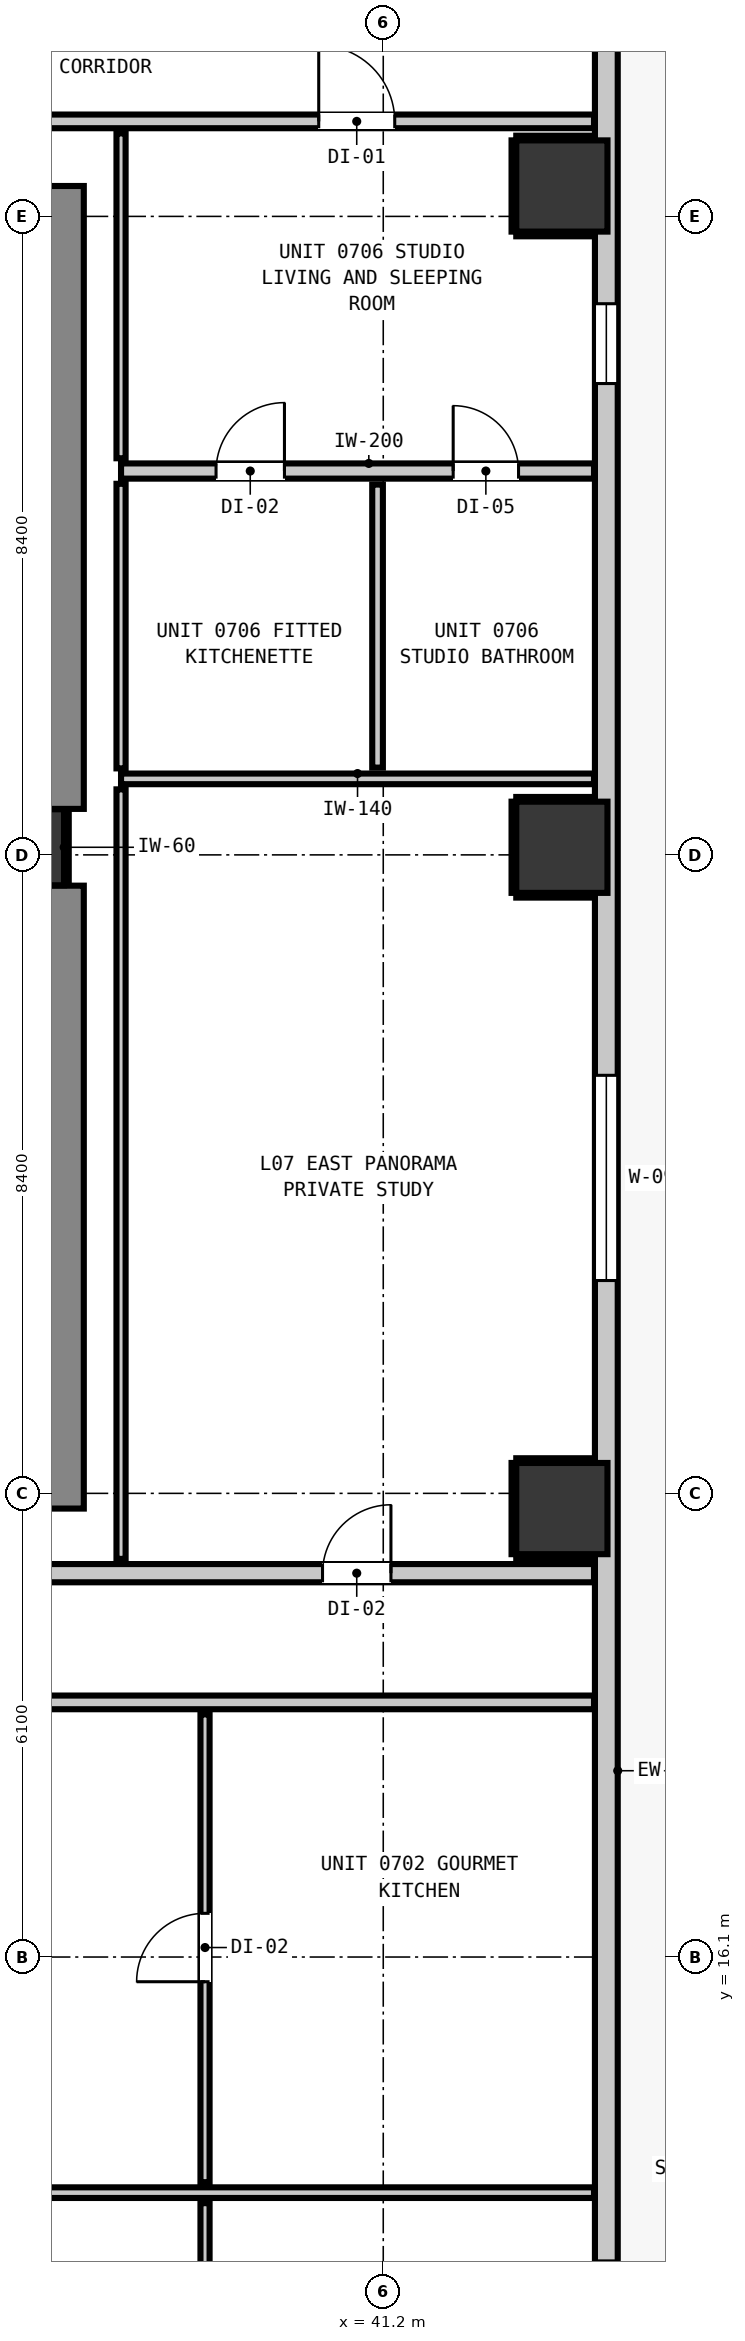
"""IFC4 building model, lengths in metres.
Left out: names, types, materials, properties, quantities, classifications, styles, units other than length and angle.
Written with IfcOpenShell. Run it as: python <this file> out.ifc"""

import sys

from ifc_helpers import new_model, si_unit, direction, frame, frame_2d, origin, origin_2d, place, context, subcontext, project, spatial, rectangle, extrude, element, fill, save


model = new_model("IFC4")
c1 = context("Model", 3, precision=1e-05, world=origin(), true_north=direction((0.0, 1.0)))
c2 = subcontext(c1, "Body", "Model", "MODEL_VIEW")
j1 = project(units=[si_unit("LENGTHUNIT", "METRE"), si_unit("PLANEANGLEUNIT", "RADIAN")], contexts=[c1])
p1 = place(None, origin())
s1 = spatial("IfcSite", under=j1, at=p1, CompositionType="ELEMENT")
p2 = place(p1, origin())
s2 = spatial("IfcBuilding", under=s1, at=p2, CompositionType="ELEMENT")
p3 = place(p2, frame((0.0, 0.0, 28.64)))
s3 = spatial("IfcBuildingStorey", under=s2, at=p3, CompositionType="ELEMENT", Elevation=28.64)
p4 = place(p3, frame((36.5, 30.7, 0.0), z_axis=(0.0, 0.0, 1.0), x_axis=(1.0, 0.0, 0.0)))
e1 = element("IfcColumn", 1, at=p4, inside=s3, PredefinedType="COLUMN", context=c2, shape_type="SweptSolid", body=[
    extrude(rectangle(XDim=1.0, YDim=1.0, at=origin_2d()), origin(), (0.0, 0.0, 1.0), 3.32),
])
p5 = place(p3, frame((36.66, 22.0, 0.0), z_axis=(0.0, 0.0, 1.0), x_axis=(0.0, 1.0, 0.0)))
e2 = element("IfcWall", 2, at=p5, inside=s3, PredefinedType="SHEAR", context=c2, shape_type="SweptSolid", body=[
    extrude(rectangle(XDim=8.195, YDim=1.2, at=frame_2d((4.098, 0.0))), origin(), (0.0, 0.0, 1.0), 3.32),
])
p6 = place(p3, frame((36.66, 31.205, 0.0), z_axis=(0.0, 0.0, 1.0), x_axis=(0.0, 1.0, 0.0)))
e3 = element("IfcWall", 3, at=p6, inside=s3, PredefinedType="SHEAR", context=c2, shape_type="SweptSolid", body=[
    extrude(rectangle(XDim=8.195, YDim=1.2, at=frame_2d((4.097, 0.0))), origin(), (0.0, 0.0, 1.0), 3.32),
])
for number, where, z_axis, x_axis in (
    (4, (43.55, 22.0, 0.0), (0.0, 0.0, 1.0), (1.0, 0.0, 0.0)),
    (5, (43.55, 30.7, 0.0), (0.0, 0.0, 1.0), (1.0, 0.0, 0.0)),
    (6, (43.55, 39.4, 0.0), (0.0, 0.0, 1.0), (1.0, 0.0, 0.0)),
):
    element("IfcColumn", number, at=place(p3, frame(where, z_axis=z_axis, x_axis=x_axis)), inside=s3, PredefinedType="COLUMN", context=c2, shape_type="SweptSolid", body=[
        extrude(rectangle(XDim=1.2, YDim=1.2, at=origin_2d()), origin(), (0.0, 0.0, 1.0), 3.32),
    ])
p7 = place(p3, frame((44.135, 44.835, 0.0), z_axis=(0.0, 0.0, 1.0), x_axis=(0.0, -1.0, 0.0)))
e7 = element("IfcWall", 7, at=p7, inside=s3, PredefinedType="STANDARD", context=c2, shape_type="SweptSolid", body=[
    extrude(rectangle(XDim=34.67, YDim=0.3, at=frame_2d((17.335, 0.0))), origin(), (0.0, 0.0, 1.0), 3.06),
])
p8 = place(p7, frame((1.251, 0.0, 0.0)))
e8 = element("IfcOpeningElement", 8, at=p8, cuts=e7, PredefinedType="OPENING", context=c2, shape_type="SweptSolid", body=[
    extrude(rectangle(XDim=1.0, YDim=2.15, at=frame_2d((0.5, 1.075))), frame((0.0, 0.16, 0.0), z_axis=(0.0, -1.0, 0.0), x_axis=(1.0, 0.0, 0.0)), (0.0, 0.0, 1.0), 0.32),
])
p9 = place(p7, frame((32.733, 0.0, 0.85)))
e9 = element("IfcOpeningElement", 9, at=p9, cuts=e7, PredefinedType="OPENING", context=c2, shape_type="SweptSolid", body=[
    extrude(rectangle(XDim=1.05, YDim=1.65, at=frame_2d((0.525, 0.825))), frame((0.0, 0.16, 0.0), z_axis=(0.0, -1.0, 0.0), x_axis=(1.0, 0.0, 0.0)), (0.0, 0.0, 1.0), 0.32),
])
p10 = place(p7, frame((17.135, 0.0, 0.85)))
e10 = element("IfcOpeningElement", 10, at=p10, cuts=e7, PredefinedType="OPENING", context=c2, shape_type="SweptSolid", body=[
    extrude(rectangle(XDim=2.7, YDim=2.0, at=frame_2d((1.35, 1.0))), frame((0.0, 0.16, 0.0), z_axis=(0.0, -1.0, 0.0), x_axis=(1.0, 0.0, 0.0)), (0.0, 0.0, 1.0), 0.32),
])
p11 = place(p7, frame((6.984, 0.0, 0.85)))
e11 = element("IfcOpeningElement", 11, at=p11, cuts=e7, PredefinedType="OPENING", context=c2, shape_type="SweptSolid", body=[
    extrude(rectangle(XDim=1.05, YDim=1.65, at=frame_2d((0.525, 0.825))), frame((0.0, 0.16, 0.0), z_axis=(0.0, -1.0, 0.0), x_axis=(1.0, 0.0, 0.0)), (0.0, 0.0, 1.0), 0.32),
])
p12 = place(p3, frame((1.827, 21.15, 0.0), z_axis=(0.0, 0.0, 1.0), x_axis=(1.0, 0.0, 0.0)))
e12 = element("IfcWall", 12, at=p12, inside=s3, PredefinedType="PARTITIONING", context=c2, shape_type="SweptSolid", body=[
    extrude(rectangle(XDim=42.146, YDim=0.24, at=frame_2d((21.073, 0.0))), origin(), (0.0, 0.0, 1.0), 3.06),
])
p13 = place(p12, frame((16.383, 0.0, 0.0)))
e13 = element("IfcOpeningElement", 13, at=p13, cuts=e12, PredefinedType="OPENING", context=c2, shape_type="SweptSolid", body=[
    extrude(rectangle(XDim=1.1, YDim=2.15, at=frame_2d((0.55, 1.075))), frame((0.0, 0.13, 0.0), z_axis=(0.0, -1.0, 0.0), x_axis=(1.0, 0.0, 0.0)), (0.0, 0.0, 1.0), 0.26),
])
p14 = place(p12, frame((8.647, 0.0, 0.0)))
e14 = element("IfcOpeningElement", 14, at=p14, cuts=e12, PredefinedType="OPENING", context=c2, shape_type="SweptSolid", body=[
    extrude(rectangle(XDim=1.4, YDim=2.15, at=frame_2d((0.7, 1.075))), frame((0.0, 0.13, 0.0), z_axis=(0.0, -1.0, 0.0), x_axis=(1.0, 0.0, 0.0)), (0.0, 0.0, 1.0), 0.26),
])
p15 = place(p12, frame((38.574, 0.0, 0.0)))
e15 = element("IfcOpeningElement", 15, at=p15, cuts=e12, PredefinedType="OPENING", context=c2, shape_type="SweptSolid", body=[
    extrude(rectangle(XDim=0.9, YDim=2.1, at=frame_2d((0.45, 1.05))), frame((0.0, 0.13, 0.0), z_axis=(0.0, -1.0, 0.0), x_axis=(1.0, 0.0, 0.0)), (0.0, 0.0, 1.0), 0.26),
])
p16 = place(p3, frame((37.75, 35.65, 0.0), z_axis=(0.0, 0.0, 1.0), x_axis=(1.0, 0.0, 0.0)))
e16 = element("IfcWall", 16, at=p16, inside=s3, PredefinedType="PARTITIONING", context=c2, shape_type="SweptSolid", body=[
    extrude(rectangle(XDim=6.223, YDim=0.2, at=frame_2d((3.111, 0.0))), origin(), (0.0, 0.0, 1.0), 3.06),
])
p17 = place(p16, frame((1.25, 0.0, 0.0)))
e17 = element("IfcOpeningElement", 17, at=p17, cuts=e16, PredefinedType="OPENING", context=c2, shape_type="SweptSolid", body=[
    extrude(rectangle(XDim=0.9, YDim=2.1, at=frame_2d((0.45, 1.05))), frame((0.0, 0.11, 0.0), z_axis=(0.0, -1.0, 0.0), x_axis=(1.0, 0.0, 0.0)), (0.0, 0.0, 1.0), 0.22),
])
p18 = place(p16, frame((4.37, 0.0, 0.0)))
e18 = element("IfcOpeningElement", 18, at=p18, cuts=e16, PredefinedType="OPENING", context=c2, shape_type="SweptSolid", body=[
    extrude(rectangle(XDim=0.86, YDim=2.02, at=frame_2d((0.43, 1.01))), frame((0.0, 0.11, 0.0), z_axis=(0.0, -1.0, 0.0), x_axis=(1.0, 0.0, 0.0)), (0.0, 0.0, 1.0), 0.22),
])
p19 = place(p3, frame((1.827, 19.45, 0.0), z_axis=(0.0, 0.0, 1.0), x_axis=(1.0, 0.0, 0.0)))
e19 = element("IfcWall", 19, at=p19, inside=s3, PredefinedType="PARTITIONING", context=c2, shape_type="SweptSolid", body=[
    extrude(rectangle(XDim=42.146, YDim=0.18, at=frame_2d((21.073, 0.0))), origin(), (0.0, 0.0, 1.0), 3.06),
])
p20 = place(p19, frame((8.602, 0.0, 0.0)))
e20 = element("IfcOpeningElement", 20, at=p20, cuts=e19, PredefinedType="OPENING", context=c2, shape_type="SweptSolid", body=[
    extrude(rectangle(XDim=1.0, YDim=2.15, at=frame_2d((0.5, 1.075))), frame((0.0, 0.1, 0.0), z_axis=(0.0, -1.0, 0.0), x_axis=(1.0, 0.0, 0.0)), (0.0, 0.0, 1.0), 0.2),
])
p21 = place(p19, frame((30.475, 0.0, 0.0)))
e21 = element("IfcOpeningElement", 21, at=p21, cuts=e19, PredefinedType="OPENING", context=c2, shape_type="SweptSolid", body=[
    extrude(rectangle(XDim=1.0, YDim=2.15, at=frame_2d((0.5, 1.075))), frame((0.0, 0.1, 0.0), z_axis=(0.0, -1.0, 0.0), x_axis=(1.0, 0.0, 0.0)), (0.0, 0.0, 1.0), 0.2),
])
p22 = place(p3, frame((12.989, 40.25, 0.0), z_axis=(0.0, 0.0, 1.0), x_axis=(1.0, 0.0, 0.0)))
e22 = element("IfcWall", 22, at=p22, inside=s3, PredefinedType="PARTITIONING", context=c2, shape_type="SweptSolid", body=[
    extrude(rectangle(XDim=30.984, YDim=0.18, at=frame_2d((15.492, 0.0))), origin(), (0.0, 0.0, 1.0), 3.06),
])
p23 = place(p22, frame((4.446, 0.0, 0.0)))
e23 = element("IfcOpeningElement", 23, at=p23, cuts=e22, PredefinedType="OPENING", context=c2, shape_type="SweptSolid", body=[
    extrude(rectangle(XDim=1.4, YDim=2.15, at=frame_2d((0.7, 1.075))), frame((0.0, 0.1, 0.0), z_axis=(0.0, -1.0, 0.0), x_axis=(1.0, 0.0, 0.0)), (0.0, 0.0, 1.0), 0.2),
])
p24 = place(p22, frame((27.362, 0.0, 0.0)))
e24 = element("IfcOpeningElement", 24, at=p24, cuts=e22, PredefinedType="OPENING", context=c2, shape_type="SweptSolid", body=[
    extrude(rectangle(XDim=1.0, YDim=2.15, at=frame_2d((0.5, 1.075))), frame((0.0, 0.1, 0.0), z_axis=(0.0, -1.0, 0.0), x_axis=(1.0, 0.0, 0.0)), (0.0, 0.0, 1.0), 0.2),
])
p25 = place(p3, frame((11.688, 13.0, 0.0), z_axis=(0.0, 0.0, 1.0), x_axis=(1.0, 0.0, 0.0)))
e25 = element("IfcWall", 25, at=p25, inside=s3, PredefinedType="PARTITIONING", context=c2, shape_type="SweptSolid", body=[
    extrude(rectangle(XDim=32.285, YDim=0.14, at=frame_2d((16.143, 0.0))), origin(), (0.0, 0.0, 1.0), 3.06),
])
p26 = place(p25, frame((20.664, 0.0, 0.0)))
e26 = element("IfcOpeningElement", 26, at=p26, cuts=e25, PredefinedType="OPENING", context=c2, shape_type="SweptSolid", body=[
    extrude(rectangle(XDim=0.9, YDim=2.1, at=frame_2d((0.45, 1.05))), frame((0.0, 0.08, 0.0), z_axis=(0.0, -1.0, 0.0), x_axis=(1.0, 0.0, 0.0)), (0.0, 0.0, 1.0), 0.16),
])
p27 = place(p3, frame((37.75, 31.6, 0.0), z_axis=(0.0, 0.0, 1.0), x_axis=(1.0, 0.0, 0.0)))
e27 = element("IfcWall", 27, at=p27, inside=s3, PredefinedType="PARTITIONING", context=c2, shape_type="SweptSolid", body=[
    extrude(rectangle(XDim=6.223, YDim=0.14, at=frame_2d((3.111, 0.0))), origin(), (0.0, 0.0, 1.0), 3.06),
])
p28 = place(p3, frame((41.125, 31.748, 0.0), z_axis=(0.0, 0.0, 1.0), x_axis=(0.0, 1.0, 0.0)))
e28 = element("IfcWall", 28, at=p28, inside=s3, PredefinedType="PARTITIONING", context=c2, shape_type="SweptSolid", body=[
    extrude(rectangle(XDim=3.724, YDim=0.14, at=frame_2d((1.862, 0.0))), origin(), (0.0, 0.0, 1.0), 3.06),
])
p29 = place(p3, frame((37.75, 21.338, 0.0), z_axis=(0.0, 0.0, 1.0), x_axis=(0.0, 1.0, 0.0)))
e29 = element("IfcWall", 29, at=p29, inside=s3, PredefinedType="PARTITIONING", context=c2, shape_type="SweptSolid", body=[
    extrude(rectangle(XDim=10.124, YDim=0.12, at=frame_2d((5.062, 0.0))), origin(), (0.0, 0.0, 1.0), 3.06),
])
p30 = place(p3, frame((37.75, 31.738, 0.0), z_axis=(0.0, 0.0, 1.0), x_axis=(0.0, 1.0, 0.0)))
e30 = element("IfcWall", 30, at=p30, inside=s3, PredefinedType="PARTITIONING", context=c2, shape_type="SweptSolid", body=[
    extrude(rectangle(XDim=3.744, YDim=0.12, at=frame_2d((1.872, 0.0))), origin(), (0.0, 0.0, 1.0), 3.06),
])
p31 = place(p3, frame((37.75, 35.818, 0.0), z_axis=(0.0, 0.0, 1.0), x_axis=(0.0, 1.0, 0.0)))
e31 = element("IfcWall", 31, at=p31, inside=s3, PredefinedType="PARTITIONING", context=c2, shape_type="SweptSolid", body=[
    extrude(rectangle(XDim=4.274, YDim=0.12, at=frame_2d((2.137, 0.0))), origin(), (0.0, 0.0, 1.0), 3.06),
])
p32 = place(p3, frame((38.855, 8.691, 0.0), z_axis=(0.0, 0.0, 1.0), x_axis=(0.0, 1.0, 0.0)))
e32 = element("IfcWall", 32, at=p32, inside=s3, PredefinedType="PARTITIONING", context=c2, shape_type="SweptSolid", body=[
    extrude(rectangle(XDim=4.171, YDim=0.12, at=frame_2d((2.085, 0.0))), origin(), (0.0, 0.0, 1.0), 2.445),
])
p33 = place(p32, frame((1.259, 0.0, 0.0)))
e33 = element("IfcOpeningElement", 33, at=p33, cuts=e32, PredefinedType="OPENING", context=c2, shape_type="SweptSolid", body=[
    extrude(rectangle(XDim=0.9, YDim=2.1, at=frame_2d((0.45, 1.05))), frame((0.0, 0.07, 0.0), z_axis=(0.0, -1.0, 0.0), x_axis=(1.0, 0.0, 0.0)), (0.0, 0.0, 1.0), 0.14),
])
p34 = place(p3, frame((38.855, 13.138, 0.0), z_axis=(0.0, 0.0, 1.0), x_axis=(0.0, 1.0, 0.0)))
e34 = element("IfcWall", 34, at=p34, inside=s3, PredefinedType="PARTITIONING", context=c2, shape_type="SweptSolid", body=[
    extrude(rectangle(XDim=6.154, YDim=0.12, at=frame_2d((3.077, 0.0))), origin(), (0.0, 0.0, 1.0), 2.445),
])
p35 = place(p34, frame((2.637, 0.0, 0.0)))
e35 = element("IfcOpeningElement", 35, at=p35, cuts=e34, PredefinedType="OPENING", context=c2, shape_type="SweptSolid", body=[
    extrude(rectangle(XDim=0.9, YDim=2.1, at=frame_2d((0.45, 1.05))), frame((0.0, 0.07, 0.0), z_axis=(0.0, -1.0, 0.0), x_axis=(1.0, 0.0, 0.0)), (0.0, 0.0, 1.0), 0.14),
])
p36 = place(p3, frame((37.032, 30.21, 0.0), z_axis=(0.0, 0.0, 1.0), x_axis=(0.0, 1.0, 0.0)))
e36 = element("IfcWall", 36, at=p36, inside=s3, PredefinedType="PARTITIONING", context=c2, shape_type="SweptSolid", body=[
    extrude(rectangle(XDim=0.98, YDim=0.06, at=frame_2d((0.49, 0.0))), origin(), (0.0, 0.0, 1.0), 1.45),
])
for number, where, z_axis, x_axis in (
    (37, (42.95, 21.368, 0.0), (0.0, 0.0, 1.0), (1.0, 0.0, 0.0)),
    (38, (42.95, 22.632, 0.0), (0.0, 0.0, 1.0), (1.0, 0.0, 0.0)),
):
    element("IfcWall", number, at=place(p3, frame(where, z_axis=z_axis, x_axis=x_axis)), inside=s3, PredefinedType="PARTITIONING", context=c2, shape_type="SweptSolid", body=[
        extrude(rectangle(XDim=1.02, YDim=0.06, at=frame_2d((0.51, 0.0))), origin(), (0.0, 0.0, 1.0), 1.45),
    ])
p37 = place(p3, frame((42.918, 21.4, 0.0), z_axis=(0.0, 0.0, 1.0), x_axis=(0.0, 1.0, 0.0)))
e39 = element("IfcWall", 39, at=p37, inside=s3, PredefinedType="PARTITIONING", context=c2, shape_type="SweptSolid", body=[
    extrude(rectangle(XDim=1.2, YDim=0.06, at=frame_2d((0.6, 0.0))), origin(), (0.0, 0.0, 1.0), 1.45),
])
for number, where, z_axis, x_axis in (
    (40, (42.95, 30.068, 0.0), (0.0, 0.0, 1.0), (1.0, 0.0, 0.0)),
    (41, (42.95, 31.332, 0.0), (0.0, 0.0, 1.0), (1.0, 0.0, 0.0)),
):
    element("IfcWall", number, at=place(p3, frame(where, z_axis=z_axis, x_axis=x_axis)), inside=s3, PredefinedType="PARTITIONING", context=c2, shape_type="SweptSolid", body=[
        extrude(rectangle(XDim=1.02, YDim=0.06, at=frame_2d((0.51, 0.0))), origin(), (0.0, 0.0, 1.0), 1.45),
    ])
p38 = place(p3, frame((42.918, 30.1, 0.0), z_axis=(0.0, 0.0, 1.0), x_axis=(0.0, 1.0, 0.0)))
e42 = element("IfcWall", 42, at=p38, inside=s3, PredefinedType="PARTITIONING", context=c2, shape_type="SweptSolid", body=[
    extrude(rectangle(XDim=1.2, YDim=0.06, at=frame_2d((0.6, 0.0))), origin(), (0.0, 0.0, 1.0), 1.45),
])
for number, where, z_axis, x_axis in (
    (43, (42.95, 38.768, 0.0), (0.0, 0.0, 1.0), (1.0, 0.0, 0.0)),
    (44, (42.95, 40.032, 0.0), (0.0, 0.0, 1.0), (1.0, 0.0, 0.0)),
):
    element("IfcWall", number, at=place(p3, frame(where, z_axis=z_axis, x_axis=x_axis)), inside=s3, PredefinedType="PARTITIONING", context=c2, shape_type="SweptSolid", body=[
        extrude(rectangle(XDim=1.02, YDim=0.06, at=frame_2d((0.51, 0.0))), origin(), (0.0, 0.0, 1.0), 1.45),
    ])
p39 = place(p3, frame((42.918, 38.8, 0.0), z_axis=(0.0, 0.0, 1.0), x_axis=(0.0, 1.0, 0.0)))
e45 = element("IfcWall", 45, at=p39, inside=s3, PredefinedType="PARTITIONING", context=c2, shape_type="SweptSolid", body=[
    extrude(rectangle(XDim=1.2, YDim=0.06, at=frame_2d((0.6, 0.0))), origin(), (0.0, 0.0, 1.0), 1.45),
])
p40 = place(p9, origin())
e46 = element("IfcWindow", 46, at=p40, inside=s3, PartitioningType="SINGLE_PANEL", PredefinedType="WINDOW", context=c2, shape_type="SweptSolid", body=[
    extrude(rectangle(XDim=1.05, YDim=1.65, at=frame_2d((0.525, 0.825))), frame((0.0, 0.03, 0.0), z_axis=(0.0, -1.0, 0.0), x_axis=(1.0, 0.0, 0.0)), (0.0, 0.0, 1.0), 0.06),
])
fill(e9, e46)
p41 = place(p10, origin())
e47 = element("IfcWindow", 47, at=p41, inside=s3, PartitioningType="SINGLE_PANEL", PredefinedType="WINDOW", context=c2, shape_type="SweptSolid", body=[
    extrude(rectangle(XDim=2.7, YDim=2.0, at=frame_2d((1.35, 1.0))), frame((0.0, 0.03, 0.0), z_axis=(0.0, -1.0, 0.0), x_axis=(1.0, 0.0, 0.0)), (0.0, 0.0, 1.0), 0.06),
])
fill(e10, e47)
p42 = place(p11, origin())
e48 = element("IfcWindow", 48, at=p42, inside=s3, PartitioningType="SINGLE_PANEL", PredefinedType="WINDOW", context=c2, shape_type="SweptSolid", body=[
    extrude(rectangle(XDim=1.05, YDim=1.65, at=frame_2d((0.525, 0.825))), frame((0.0, 0.03, 0.0), z_axis=(0.0, -1.0, 0.0), x_axis=(1.0, 0.0, 0.0)), (0.0, 0.0, 1.0), 0.06),
])
fill(e11, e48)
p43 = place(p35, origin())
e49 = element("IfcDoor", 49, at=p43, inside=s3, OperationType="SINGLE_SWING_LEFT", PredefinedType="DOOR", context=c2, shape_type="SweptSolid", body=[
    extrude(rectangle(XDim=0.9, YDim=2.1, at=frame_2d((0.45, 1.05))), frame((0.0, 0.025, 0.0), z_axis=(0.0, -1.0, 0.0), x_axis=(1.0, 0.0, 0.0)), (0.0, 0.0, 1.0), 0.05),
])
fill(e35, e49)
p44 = place(p15, origin())
e50 = element("IfcDoor", 50, at=p44, inside=s3, OperationType="SINGLE_SWING_RIGHT", PredefinedType="DOOR", context=c2, shape_type="SweptSolid", body=[
    extrude(rectangle(XDim=0.9, YDim=2.1, at=frame_2d((0.45, 1.05))), frame((0.0, 0.025, 0.0), z_axis=(0.0, -1.0, 0.0), x_axis=(1.0, 0.0, 0.0)), (0.0, 0.0, 1.0), 0.05),
])
fill(e15, e50)
p45 = place(p24, origin())
e51 = element("IfcDoor", 51, at=p45, inside=s3, OperationType="SINGLE_SWING_LEFT", PredefinedType="DOOR", context=c2, shape_type="SweptSolid", body=[
    extrude(rectangle(XDim=1.0, YDim=2.15, at=frame_2d((0.5, 1.075))), frame((0.0, 0.025, 0.0), z_axis=(0.0, -1.0, 0.0), x_axis=(1.0, 0.0, 0.0)), (0.0, 0.0, 1.0), 0.05),
])
fill(e24, e51)
p46 = place(p17, origin())
e52 = element("IfcDoor", 52, at=p46, inside=s3, OperationType="SINGLE_SWING_RIGHT", PredefinedType="DOOR", context=c2, shape_type="SweptSolid", body=[
    extrude(rectangle(XDim=0.9, YDim=2.1, at=frame_2d((0.45, 1.05))), frame((0.0, 0.025, 0.0), z_axis=(0.0, -1.0, 0.0), x_axis=(1.0, 0.0, 0.0)), (0.0, 0.0, 1.0), 0.05),
])
fill(e17, e52)
p47 = place(p18, origin())
e53 = element("IfcDoor", 53, at=p47, inside=s3, OperationType="SINGLE_SWING_LEFT", PredefinedType="DOOR", context=c2, shape_type="SweptSolid", body=[
    extrude(rectangle(XDim=0.86, YDim=2.02, at=frame_2d((0.43, 1.01))), frame((0.0, 0.025, 0.0), z_axis=(0.0, -1.0, 0.0), x_axis=(1.0, 0.0, 0.0)), (0.0, 0.0, 1.0), 0.05),
])
fill(e18, e53)
save(model, sys.argv[1])
